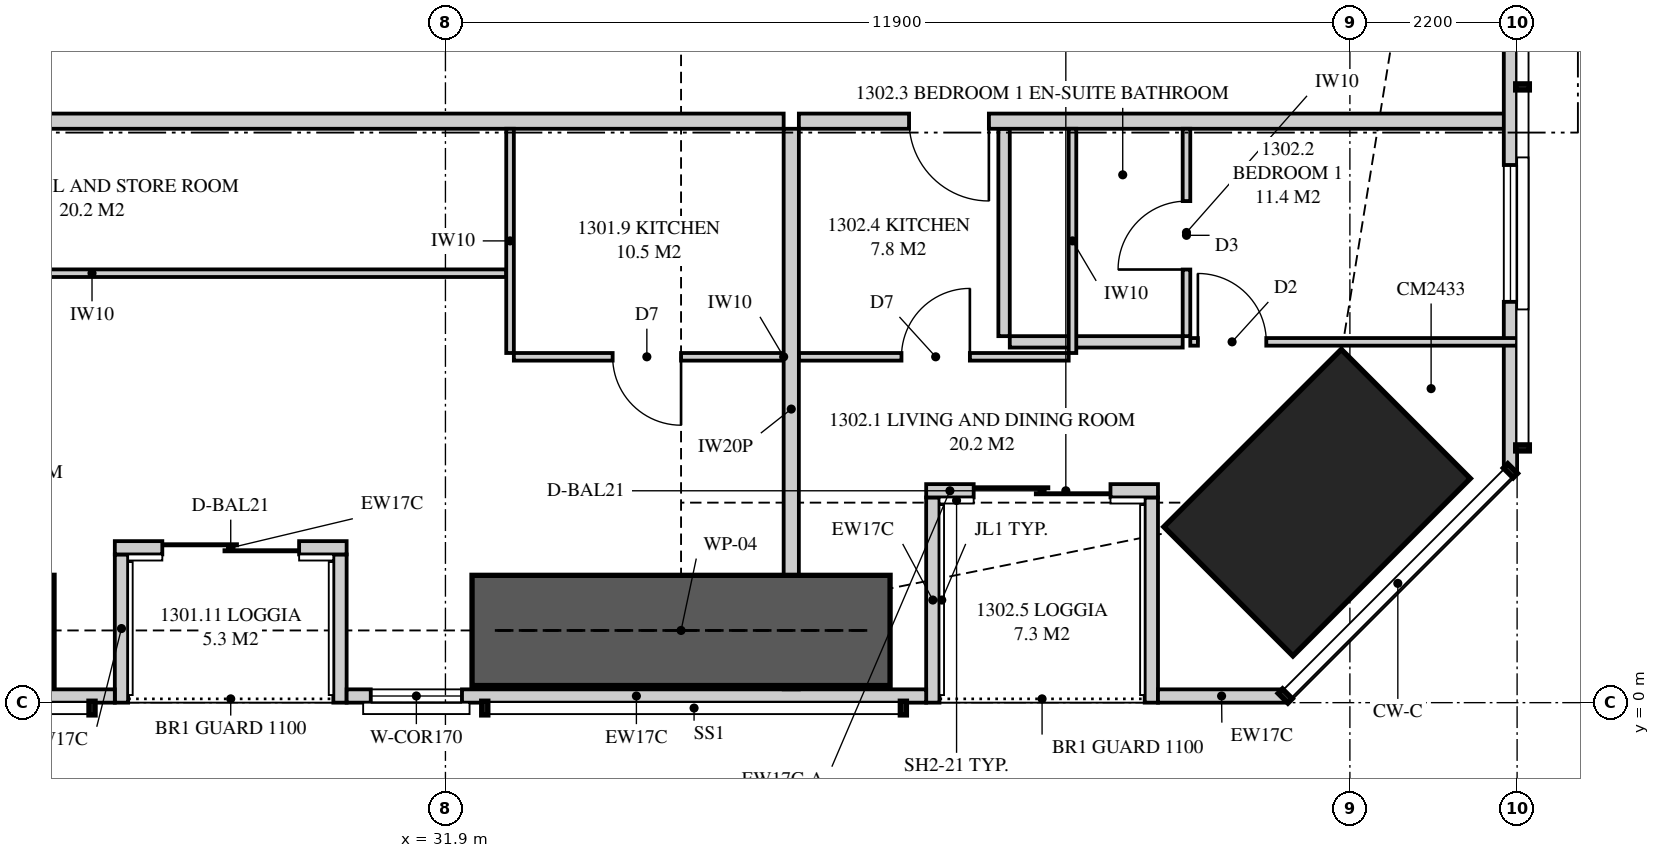
"""IFC4 building model, lengths in metres.
Left out: names, types, materials, properties, quantities, classifications, styles, units other than length and angle.
Written with IfcOpenShell. Run it as: python <this file> out.ifc"""

import sys

from ifc_helpers import new_model, si_unit, direction, frame, frame_2d, origin, origin_2d, place, context, subcontext, project, spatial, polyline, rectangle, outline, extrude, element, fill, save


model = new_model("IFC4")
c1 = context("Model", 3, precision=1e-05, world=origin(), true_north=direction((0.0, 1.0)))
c2 = subcontext(c1, "Body", "Model", "MODEL_VIEW")
j1 = project(units=[si_unit("LENGTHUNIT", "METRE"), si_unit("PLANEANGLEUNIT", "RADIAN")], contexts=[c1])
p1 = place(None, origin())
s1 = spatial("IfcSite", under=j1, at=p1, CompositionType="ELEMENT")
p2 = place(p1, origin())
s2 = spatial("IfcBuilding", under=s1, at=p2, CompositionType="ELEMENT")
p3 = place(p2, frame((0.0, 0.0, 51.15)))
s3 = spatial("IfcBuildingStorey", under=s2, at=p3, CompositionType="ELEMENT", Elevation=51.15)
p4 = place(p3, frame((43.369, 2.631, 0.0), z_axis=(0.0, 0.0, 1.0), x_axis=(-0.707106781187, 0.707106781187, 0.0)))
e1 = element("IfcColumn", 1, at=p4, inside=s3, PredefinedType="COLUMN", context=c2, shape_type="SweptSolid", body=[
    extrude(rectangle(XDim=2.4, YDim=3.3, at=origin_2d()), origin(), (0.0, 0.0, 1.0), 3.35),
])
p5 = place(p3, frame((5.051, 0.087, 0.0), z_axis=(0.0, 0.0, 1.0), x_axis=(1.0, 0.0, 0.0)))
e2 = element("IfcWall", 2, at=p5, inside=s3, PredefinedType="SOLIDWALL", context=c2, shape_type="SweptSolid", body=[
    extrude(outline(polyline([(0.0, 0.0), (22.499, 0.0), (22.499, 2.15), (7.949, 2.15), (7.949, 3.11), (7.793, 3.11), (7.793, 2.15), (7.745, 2.15), (7.745, 3.11), (0.0, 3.11), (0.0, 0.0)])), frame((0.0, 0.087, 0.0), z_axis=(0.0, -1.0, 0.0), x_axis=(1.0, 0.0, 0.0)), (0.0, 0.0, 1.0), 0.175),
])
p6 = place(p5, frame((3.234, 0.0, 0.4)))
e3 = element("IfcOpeningElement", 3, at=p6, cuts=e2, PredefinedType="OPENING", context=c2, shape_type="SweptSolid", body=[
    extrude(rectangle(XDim=1.8, YDim=1.7, at=frame_2d((0.9, 0.85))), frame((0.0, 0.097, 0.0), z_axis=(0.0, -1.0, 0.0), x_axis=(1.0, 0.0, 0.0)), (0.0, 0.0, 1.0), 0.195),
])
p7 = place(p5, frame((10.806, 0.0, 0.4)))
e4 = element("IfcOpeningElement", 4, at=p7, cuts=e2, PredefinedType="OPENING", context=c2, shape_type="SweptSolid", body=[
    extrude(rectangle(XDim=1.8, YDim=1.7, at=frame_2d((0.9, 0.85))), frame((0.0, 0.097, 0.0), z_axis=(0.0, -1.0, 0.0), x_axis=(1.0, 0.0, 0.0)), (0.0, 0.0, 1.0), 0.195),
])
p8 = place(p5, frame((13.974, 0.0, 0.4)))
e5 = element("IfcOpeningElement", 5, at=p8, cuts=e2, PredefinedType="OPENING", context=c2, shape_type="SweptSolid", body=[
    extrude(rectangle(XDim=1.8, YDim=1.7, at=frame_2d((0.9, 0.85))), frame((0.0, 0.097, 0.0), z_axis=(0.0, -1.0, 0.0), x_axis=(1.0, 0.0, 0.0)), (0.0, 0.0, 1.0), 0.195),
])
p9 = place(p3, frame((30.6, 0.087, 0.0), z_axis=(0.0, 0.0, 1.0), x_axis=(1.0, 0.0, 0.0)))
e6 = element("IfcWall", 6, at=p9, inside=s3, PredefinedType="SOLIDWALL", context=c2, shape_type="SweptSolid", body=[
    extrude(outline(polyline([(0.0, 0.0), (7.625, 0.0), (7.625, 3.11), (4.604, 3.11), (4.604, 2.15), (4.556, 2.15), (4.556, 3.11), (4.4, 3.11), (4.4, 2.15), (0.0, 2.15), (0.0, 0.0)])), frame((0.0, 0.087, 0.0), z_axis=(0.0, -1.0, 0.0), x_axis=(1.0, 0.0, 0.0)), (0.0, 0.0, 1.0), 0.175),
])
p10 = place(p9, frame((0.317, 0.0, 0.4)))
e7 = element("IfcOpeningElement", 7, at=p10, cuts=e6, PredefinedType="OPENING", context=c2, shape_type="SweptSolid", body=[
    extrude(rectangle(XDim=1.2, YDim=1.7, at=frame_2d((0.6, 0.85))), frame((0.0, 0.097, 0.0), z_axis=(0.0, -1.0, 0.0), x_axis=(1.0, 0.0, 0.0)), (0.0, 0.0, 1.0), 0.195),
])
p11 = place(p3, frame((41.275, 0.087, 0.0), z_axis=(0.0, 0.0, 1.0), x_axis=(1.0, 0.0, 0.0)))
e8 = element("IfcWall", 8, at=p11, inside=s3, PredefinedType="SOLIDWALL", context=c2, shape_type="SweptSolid", body=[
    extrude(rectangle(XDim=1.674, YDim=0.175, at=frame_2d((0.837, 0.0))), origin(), (0.0, 0.0, 1.0), 3.11),
])
p12 = place(p3, frame((27.55, 2.038, 0.0), z_axis=(0.0, 0.0, 1.0), x_axis=(1.0, 0.0, 0.0)))
e9 = element("IfcWall", 9, at=p12, inside=s3, PredefinedType="SOLIDWALL", context=c2, shape_type="SweptSolid", body=[
    extrude(rectangle(XDim=3.05, YDim=0.175, at=frame_2d((1.525, 0.0))), origin(), (0.0, 0.0, 1.0), 3.11),
])
p13 = place(p12, frame((0.625, 0.0, 0.0)))
e10 = element("IfcOpeningElement", 10, at=p13, cuts=e9, PredefinedType="OPENING", context=c2, shape_type="SweptSolid", body=[
    extrude(rectangle(XDim=1.8, YDim=2.1, at=frame_2d((0.9, 1.05))), frame((0.0, 0.097, 0.0), z_axis=(0.0, -1.0, 0.0), x_axis=(1.0, 0.0, 0.0)), (0.0, 0.0, 1.0), 0.195),
])
for number, where, z_axis, x_axis in (
    (11, (27.637, 0.0, 0.0), (0.0, 0.0, 1.0), (0.0, 1.0, 0.0)),
    (12, (30.512, 0.0, 0.0), (0.0, 0.0, 1.0), (0.0, 1.0, 0.0)),
):
    element("IfcWall", number, at=place(p3, frame(where, z_axis=z_axis, x_axis=x_axis)), inside=s3, PredefinedType="SOLIDWALL", context=c2, shape_type="SweptSolid", body=[
        extrude(outline(polyline([(0.0, 0.0), (1.95, 0.0), (1.95, 3.11), (1.75, 3.11), (1.75, 2.15), (0.15, 2.15), (0.15, 3.11), (0.0, 3.11), (0.0, 0.0)])), frame((0.0, 0.087, 0.0), z_axis=(0.0, -1.0, 0.0), x_axis=(1.0, 0.0, 0.0)), (0.0, 0.0, 1.0), 0.175),
    ])
p14 = place(p3, frame((38.225, 2.788, 0.0), z_axis=(0.0, 0.0, 1.0), x_axis=(1.0, 0.0, 0.0)))
e13 = element("IfcWall", 13, at=p14, inside=s3, PredefinedType="SOLIDWALL", context=c2, shape_type="SweptSolid", body=[
    extrude(rectangle(XDim=0.625, YDim=0.175, at=frame_2d((0.312, 0.0))), origin(), (0.0, 0.0, 1.0), 2.51),
])
p15 = place(p3, frame((38.85, 2.788, 0.0), z_axis=(0.0, 0.0, 1.0), x_axis=(1.0, 0.0, 0.0)))
e14 = element("IfcWall", 14, at=p15, inside=s3, PredefinedType="SOLIDWALL", context=c2, shape_type="SweptSolid", body=[
    extrude(rectangle(XDim=2.425, YDim=0.175, at=frame_2d((1.212, 0.0))), origin(), (0.0, 0.0, 1.0), 2.15),
])
p16 = place(p15, origin())
e15 = element("IfcOpeningElement", 15, at=p16, cuts=e14, PredefinedType="OPENING", context=c2, shape_type="SweptSolid", body=[
    extrude(rectangle(XDim=1.8, YDim=2.1, at=frame_2d((0.9, 1.05))), frame((0.0, 0.097, 0.0), z_axis=(0.0, -1.0, 0.0), x_axis=(1.0, 0.0, 0.0)), (0.0, 0.0, 1.0), 0.195),
])
p17 = place(p3, frame((38.312, 0.0, 0.0), z_axis=(0.0, 0.0, 1.0), x_axis=(0.0, 1.0, 0.0)))
e16 = element("IfcWall", 16, at=p17, inside=s3, PredefinedType="SOLIDWALL", context=c2, shape_type="SweptSolid", body=[
    extrude(outline(polyline([(0.0, 0.0), (2.7, 0.0), (2.7, 2.51), (2.449, 2.51), (2.449, 2.15), (0.782, 2.15), (0.782, 3.11), (0.0, 3.11), (0.0, 0.0)])), frame((0.0, 0.087, 0.0), z_axis=(0.0, -1.0, 0.0), x_axis=(1.0, 0.0, 0.0)), (0.0, 0.0, 1.0), 0.175),
])
p18 = place(p3, frame((41.188, 0.0, 0.0), z_axis=(0.0, 0.0, 1.0), x_axis=(0.0, 1.0, 0.0)))
e17 = element("IfcWall", 17, at=p18, inside=s3, PredefinedType="SOLIDWALL", context=c2, shape_type="SweptSolid", body=[
    extrude(outline(polyline([(0.0, 0.0), (2.7, 0.0), (2.7, 2.15), (1.36, 2.15), (1.36, 3.11), (0.0, 3.11), (0.0, 0.0)])), frame((0.0, 0.087, 0.0), z_axis=(0.0, -1.0, 0.0), x_axis=(1.0, 0.0, 0.0)), (0.0, 0.0, 1.0), 0.175),
])
p19 = place(p3, frame((45.913, 3.051, 0.0), z_axis=(0.0, 0.0, 1.0), x_axis=(0.0, 1.0, 0.0)))
e18 = element("IfcWall", 18, at=p19, inside=s3, PredefinedType="SOLIDWALL", context=c2, shape_type="SweptSolid", body=[
    extrude(outline(polyline([(0.0, 0.0), (31.897, 0.0), (31.897, 3.11), (22.167, 3.11), (22.167, 2.15), (22.074, 2.15), (22.074, 3.11), (21.949, 3.11), (21.949, 2.15), (9.949, 2.15), (9.949, 3.11), (9.823, 3.11), (9.823, 2.15), (9.73, 2.15), (9.73, 3.11), (0.0, 3.11), (0.0, 0.0)])), frame((0.0, 0.087, 0.0), z_axis=(0.0, -1.0, 0.0), x_axis=(1.0, 0.0, 0.0)), (0.0, 0.0, 1.0), 0.175),
])
p20 = place(p19, frame((2.222, 0.0, 0.4)))
e19 = element("IfcOpeningElement", 19, at=p20, cuts=e18, PredefinedType="OPENING", context=c2, shape_type="SweptSolid", body=[
    extrude(rectangle(XDim=1.8, YDim=1.7, at=frame_2d((0.9, 0.85))), frame((0.0, 0.097, 0.0), z_axis=(0.0, -1.0, 0.0), x_axis=(1.0, 0.0, 0.0)), (0.0, 0.0, 1.0), 0.195),
])
p21 = place(p19, frame((14.849, 0.0, 0.4)))
e20 = element("IfcOpeningElement", 20, at=p21, cuts=e18, PredefinedType="OPENING", context=c2, shape_type="SweptSolid", body=[
    extrude(rectangle(XDim=1.2, YDim=1.7, at=frame_2d((0.6, 0.85))), frame((0.0, 0.097, 0.0), z_axis=(0.0, -1.0, 0.0), x_axis=(1.0, 0.0, 0.0)), (0.0, 0.0, 1.0), 0.195),
])
p22 = place(p19, frame((27.375, 0.0, 0.4)))
e21 = element("IfcOpeningElement", 21, at=p22, cuts=e18, PredefinedType="OPENING", context=c2, shape_type="SweptSolid", body=[
    extrude(rectangle(XDim=1.8, YDim=1.7, at=frame_2d((0.9, 0.85))), frame((0.0, 0.097, 0.0), z_axis=(0.0, -1.0, 0.0), x_axis=(1.0, 0.0, 0.0)), (0.0, 0.0, 1.0), 0.195),
])
p23 = place(p3, frame((36.45, 0.175, 0.0), z_axis=(0.0, 0.0, 1.0), x_axis=(0.0, 1.0, 0.0)))
e22 = element("IfcWall", 22, at=p23, inside=s3, PredefinedType="PARTITIONING", context=c2, shape_type="SweptSolid", body=[
    extrude(outline(polyline([(0.138, 3.11), (0.0, 3.11), (0.0, 0.0), (0.529, 0.0), (0.529, 0.513), (1.021, 0.513), (1.021, 0.0), (7.375, 0.0), (7.375, 3.11), (3.766, 3.11), (3.766, 2.51), (1.994, 2.51), (1.994, 2.15), (1.021, 2.15), (1.021, 1.637), (0.529, 1.637), (0.529, 2.15), (0.138, 2.15), (0.138, 3.11)])), frame((0.0, 0.1, 0.0), z_axis=(0.0, -1.0, 0.0), x_axis=(1.0, 0.0, 0.0)), (0.0, 0.0, 1.0), 0.2),
])
p24 = place(p3, frame((17.725, 7.65, 0.0), z_axis=(0.0, 0.0, 1.0), x_axis=(1.0, 0.0, 0.0)))
e23 = element("IfcWall", 23, at=p24, inside=s3, PredefinedType="PARTITIONING", context=c2, shape_type="SweptSolid", body=[
    extrude(outline(polyline([(0.0, 0.0), (18.625, 0.0), (18.625, 3.11), (17.612, 3.11), (17.612, 2.541), (16.938, 2.541), (16.938, 3.11), (6.612, 3.11), (6.612, 2.541), (5.938, 2.541), (5.938, 3.11), (0.0, 3.11), (0.0, 0.0)])), frame((0.0, 0.1, 0.0), z_axis=(0.0, -1.0, 0.0), x_axis=(1.0, 0.0, 0.0)), (0.0, 0.0, 1.0), 0.2),
])
p25 = place(p24, frame((1.0, 0.0, 0.0)))
e24 = element("IfcOpeningElement", 24, at=p25, cuts=e23, PredefinedType="OPENING", context=c2, shape_type="SweptSolid", body=[
    extrude(rectangle(XDim=1.05, YDim=2.2, at=frame_2d((0.525, 1.1))), frame((0.0, 0.11, 0.0), z_axis=(0.0, -1.0, 0.0), x_axis=(1.0, 0.0, 0.0)), (0.0, 0.0, 1.0), 0.22),
])
p26 = place(p3, frame((32.8, 4.55, 0.0), z_axis=(0.0, 0.0, 1.0), x_axis=(1.0, 0.0, 0.0)))
e25 = element("IfcWall", 25, at=p26, inside=s3, PredefinedType="PARTITIONING", context=c2, shape_type="SweptSolid", body=[
    extrude(outline(polyline([(0.0, 0.0), (3.55, 0.0), (3.55, 3.11), (2.487, 3.11), (2.487, 2.541), (1.913, 2.541), (1.913, 3.11), (0.0, 3.11), (0.0, 0.0)])), frame((0.0, 0.05, 0.0), z_axis=(0.0, -1.0, 0.0), x_axis=(1.0, 0.0, 0.0)), (0.0, 0.0, 1.0), 0.1),
])
p27 = place(p26, frame((1.3, 0.0, 0.0)))
e26 = element("IfcOpeningElement", 26, at=p27, cuts=e25, PredefinedType="OPENING", context=c2, shape_type="SweptSolid", body=[
    extrude(rectangle(XDim=0.9, YDim=2.1, at=frame_2d((0.45, 1.05))), frame((0.0, 0.06, 0.0), z_axis=(0.0, -1.0, 0.0), x_axis=(1.0, 0.0, 0.0)), (0.0, 0.0, 1.0), 0.12),
])
p28 = place(p3, frame((32.75, 4.6, 0.0), z_axis=(0.0, 0.0, 1.0), x_axis=(0.0, 1.0, 0.0)))
e27 = element("IfcWall", 27, at=p28, inside=s3, PredefinedType="PARTITIONING", context=c2, shape_type="SweptSolid", body=[
    extrude(rectangle(XDim=2.95, YDim=0.1, at=frame_2d((1.475, 0.0))), origin(), (0.0, 0.0, 1.0), 3.11),
])
p29 = place(p3, frame((21.8, 5.65, 0.0), z_axis=(0.0, 0.0, 1.0), x_axis=(1.0, 0.0, 0.0)))
e28 = element("IfcWall", 28, at=p29, inside=s3, PredefinedType="PARTITIONING", context=c2, shape_type="SweptSolid", body=[
    extrude(outline(polyline([(0.0, 0.0), (10.9, 0.0), (10.9, 3.11), (2.487, 3.11), (2.487, 2.541), (1.913, 2.541), (1.913, 3.11), (0.0, 3.11), (0.0, 0.0)])), frame((0.0, 0.05, 0.0), z_axis=(0.0, -1.0, 0.0), x_axis=(1.0, 0.0, 0.0)), (0.0, 0.0, 1.0), 0.1),
])
p30 = place(p29, frame((0.3, 0.0, 0.0)))
e29 = element("IfcOpeningElement", 29, at=p30, cuts=e28, PredefinedType="OPENING", context=c2, shape_type="SweptSolid", body=[
    extrude(rectangle(XDim=1.0, YDim=2.1, at=frame_2d((0.5, 1.05))), frame((0.0, 0.06, 0.0), z_axis=(0.0, -1.0, 0.0), x_axis=(1.0, 0.0, 0.0)), (0.0, 0.0, 1.0), 0.12),
])
p31 = place(p3, frame((36.55, 7.65, 0.0), z_axis=(0.0, 0.0, 1.0), x_axis=(1.0, 0.0, 0.0)))
e30 = element("IfcWall", 30, at=p31, inside=s3, PredefinedType="PARTITIONING", context=c2, shape_type="SweptSolid", body=[
    extrude(outline(polyline([(0.0, 0.0), (9.45, 0.0), (9.45, 3.11), (8.554, 3.11), (8.554, 2.15), (6.71, 2.15), (6.71, 3.11), (0.0, 3.11), (0.0, 0.0)])), frame((0.0, 0.1, 0.0), z_axis=(0.0, -1.0, 0.0), x_axis=(1.0, 0.0, 0.0)), (0.0, 0.0, 1.0), 0.2),
])
p32 = place(p31, frame((1.45, 0.0, 0.0)))
e31 = element("IfcOpeningElement", 31, at=p32, cuts=e30, PredefinedType="OPENING", context=c2, shape_type="SweptSolid", body=[
    extrude(rectangle(XDim=1.05, YDim=2.2, at=frame_2d((0.525, 1.1))), frame((0.0, 0.11, 0.0), z_axis=(0.0, -1.0, 0.0), x_axis=(1.0, 0.0, 0.0)), (0.0, 0.0, 1.0), 0.22),
])
p33 = place(p3, frame((41.65, 4.822, 0.0), z_axis=(0.0, 0.0, 1.0), x_axis=(0.0, 1.0, 0.0)))
e32 = element("IfcWall", 32, at=p33, inside=s3, PredefinedType="PARTITIONING", context=c2, shape_type="SweptSolid", body=[
    extrude(rectangle(XDim=2.728, YDim=0.1, at=frame_2d((1.364, 0.0))), origin(), (0.0, 0.0, 1.0), 3.11),
])
p34 = place(p33, frame((0.877, 0.0, 0.0)))
e33 = element("IfcOpeningElement", 33, at=p34, cuts=e32, PredefinedType="OPENING", context=c2, shape_type="SweptSolid", body=[
    extrude(rectangle(XDim=0.9, YDim=2.1, at=frame_2d((0.45, 1.05))), frame((0.0, 0.06, 0.0), z_axis=(0.0, -1.0, 0.0), x_axis=(1.0, 0.0, 0.0)), (0.0, 0.0, 1.0), 0.12),
])
p35 = place(p3, frame((41.7, 4.747, 0.0), z_axis=(0.0, 0.0, 1.0), x_axis=(1.0, 0.0, 0.0)))
e34 = element("IfcWall", 34, at=p35, inside=s3, PredefinedType="PARTITIONING", context=c2, shape_type="SweptSolid", body=[
    extrude(outline(polyline([(0.0, 0.0), (4.3, 0.0), (4.3, 3.11), (2.883, 3.11), (2.883, 2.15), (1.14, 2.15), (1.14, 3.11), (0.0, 3.11), (0.0, 0.0)])), frame((0.0, 0.05, 0.0), z_axis=(0.0, -1.0, 0.0), x_axis=(1.0, 0.0, 0.0)), (0.0, 0.0, 1.0), 0.1),
])
p36 = place(p35, frame((0.1, 0.0, 0.0)))
e35 = element("IfcOpeningElement", 35, at=p36, cuts=e34, PredefinedType="OPENING", context=c2, shape_type="SweptSolid", body=[
    extrude(rectangle(XDim=0.9, YDim=2.1, at=frame_2d((0.45, 1.05))), frame((0.0, 0.06, 0.0), z_axis=(0.0, -1.0, 0.0), x_axis=(1.0, 0.0, 0.0)), (0.0, 0.0, 1.0), 0.12),
])
p37 = place(p3, frame((39.325, 4.747, 0.0), z_axis=(0.0, 0.0, 1.0), x_axis=(1.0, 0.0, 0.0)))
e36 = element("IfcWall", 36, at=p37, inside=s3, PredefinedType="PLUMBINGWALL", context=c2, shape_type="SweptSolid", body=[
    extrude(rectangle(XDim=2.275, YDim=0.15, at=frame_2d((1.138, 0.0))), origin(), (0.0, 0.0, 1.0), 3.11),
])
p38 = place(p3, frame((39.25, 4.822, 0.0), z_axis=(0.0, 0.0, 1.0), x_axis=(0.0, 1.0, 0.0)))
e37 = element("IfcWall", 37, at=p38, inside=s3, PredefinedType="PLUMBINGWALL", context=c2, shape_type="SweptSolid", body=[
    extrude(rectangle(XDim=2.728, YDim=0.15, at=frame_2d((1.364, 0.0))), origin(), (0.0, 0.0, 1.0), 3.11),
])
p39 = place(p3, frame((36.55, 4.55, 0.0), z_axis=(0.0, 0.0, 1.0), x_axis=(1.0, 0.0, 0.0)))
e38 = element("IfcWall", 38, at=p39, inside=s3, PredefinedType="PARTITIONING", context=c2, shape_type="SweptSolid", body=[
    extrude(rectangle(XDim=3.55, YDim=0.1, at=frame_2d((1.775, 0.0))), origin(), (0.0, 0.0, 1.0), 3.11),
])
p40 = place(p39, frame((1.35, 0.0, 0.0)))
e39 = element("IfcOpeningElement", 39, at=p40, cuts=e38, PredefinedType="OPENING", context=c2, shape_type="SweptSolid", body=[
    extrude(rectangle(XDim=0.9, YDim=2.1, at=frame_2d((0.45, 1.05))), frame((0.0, 0.06, 0.0), z_axis=(0.0, -1.0, 0.0), x_axis=(1.0, 0.0, 0.0)), (0.0, 0.0, 1.0), 0.12),
])
p41 = place(p3, frame((40.15, 4.6, 0.0), z_axis=(0.0, 0.0, 1.0), x_axis=(0.0, 1.0, 0.0)))
e40 = element("IfcWall", 40, at=p41, inside=s3, PredefinedType="PARTITIONING", context=c2, shape_type="SweptSolid", body=[
    extrude(rectangle(XDim=2.95, YDim=0.1, at=frame_2d((1.475, 0.0))), origin(), (0.0, 0.0, 1.0), 3.11),
])
for number, where, z_axis, x_axis in (
    (41, (21.25, 0.95, 0.0), (0.0, 0.0, 1.0), (1.0, 0.0, 0.0)),
    (42, (32.25, 0.95, 0.0), (0.0, 0.0, 1.0), (1.0, 0.0, 0.0)),
):
    element("IfcWall", number, at=place(p3, frame(where, z_axis=z_axis, x_axis=x_axis)), inside=s3, PredefinedType="SHEAR", context=c2, shape_type="SweptSolid", body=[
        extrude(rectangle(XDim=5.5, YDim=1.45, at=frame_2d((2.75, 0.0))), origin(), (0.0, 0.0, 1.0), 3.35),
    ])
p42 = place(p13, origin())
e43 = element("IfcDoor", 43, at=p42, inside=s3, OperationType="SLIDING_TO_LEFT", PredefinedType="DOOR", context=c2, shape_type="SweptSolid", body=[
    extrude(rectangle(XDim=1.8, YDim=2.1, at=frame_2d((0.9, 1.05))), frame((0.0, 0.025, 0.0), z_axis=(0.0, -1.0, 0.0), x_axis=(1.0, 0.0, 0.0)), (0.0, 0.0, 1.0), 0.05),
])
fill(e10, e43)
p43 = place(p10, origin())
e44 = element("IfcWindow", 44, at=p43, inside=s3, PartitioningType="SINGLE_PANEL", PredefinedType="WINDOW", context=c2, shape_type="SweptSolid", body=[
    extrude(rectangle(XDim=1.2, YDim=1.7, at=frame_2d((0.6, 0.85))), frame((0.0, 0.03, 0.0), z_axis=(0.0, -1.0, 0.0), x_axis=(1.0, 0.0, 0.0)), (0.0, 0.0, 1.0), 0.06),
])
fill(e7, e44)
p44 = place(p16, origin())
e45 = element("IfcDoor", 45, at=p44, inside=s3, OperationType="SLIDING_TO_LEFT", PredefinedType="DOOR", context=c2, shape_type="SweptSolid", body=[
    extrude(rectangle(XDim=1.8, YDim=2.1, at=frame_2d((0.9, 1.05))), frame((0.0, 0.025, 0.0), z_axis=(0.0, -1.0, 0.0), x_axis=(1.0, 0.0, 0.0)), (0.0, 0.0, 1.0), 0.05),
])
fill(e15, e45)
p45 = place(p20, origin())
e46 = element("IfcWindow", 46, at=p45, inside=s3, PartitioningType="SINGLE_PANEL", PredefinedType="WINDOW", context=c2, shape_type="SweptSolid", body=[
    extrude(rectangle(XDim=1.8, YDim=1.7, at=frame_2d((0.9, 0.85))), frame((0.0, 0.03, 0.0), z_axis=(0.0, -1.0, 0.0), x_axis=(1.0, 0.0, 0.0)), (0.0, 0.0, 1.0), 0.06),
])
fill(e19, e46)
p46 = place(p27, frame((0.9, 0.0, 0.0), z_axis=(0.0, 0.0, 1.0), x_axis=(-1.0, 0.0, 0.0)))
e47 = element("IfcDoor", 47, at=p46, inside=s3, OperationType="SINGLE_SWING_LEFT", PredefinedType="DOOR", context=c2, shape_type="SweptSolid", body=[
    extrude(rectangle(XDim=0.9, YDim=2.1, at=frame_2d((0.45, 1.05))), frame((0.0, 0.025, 0.0), z_axis=(0.0, -1.0, 0.0), x_axis=(1.0, 0.0, 0.0)), (0.0, 0.0, 1.0), 0.05),
])
fill(e26, e47)
p47 = place(p32, frame((1.05, 0.0, 0.0), z_axis=(0.0, 0.0, 1.0), x_axis=(-1.0, 0.0, 0.0)))
e48 = element("IfcDoor", 48, at=p47, inside=s3, OperationType="SINGLE_SWING_LEFT", PredefinedType="DOOR", context=c2, shape_type="SweptSolid", body=[
    extrude(rectangle(XDim=1.05, YDim=2.2, at=frame_2d((0.525, 1.1))), frame((0.0, 0.025, 0.0), z_axis=(0.0, -1.0, 0.0), x_axis=(1.0, 0.0, 0.0)), (0.0, 0.0, 1.0), 0.05),
])
fill(e31, e48)
p48 = place(p36, origin())
e49 = element("IfcDoor", 49, at=p48, inside=s3, OperationType="SINGLE_SWING_LEFT", PredefinedType="DOOR", context=c2, shape_type="SweptSolid", body=[
    extrude(rectangle(XDim=0.9, YDim=2.1, at=frame_2d((0.45, 1.05))), frame((0.0, 0.025, 0.0), z_axis=(0.0, -1.0, 0.0), x_axis=(1.0, 0.0, 0.0)), (0.0, 0.0, 1.0), 0.05),
])
fill(e35, e49)
p49 = place(p34, origin())
e50 = element("IfcDoor", 50, at=p49, inside=s3, OperationType="SINGLE_SWING_LEFT", PredefinedType="DOOR", context=c2, shape_type="SweptSolid", body=[
    extrude(rectangle(XDim=0.9, YDim=2.1, at=frame_2d((0.45, 1.05))), frame((0.0, 0.025, 0.0), z_axis=(0.0, -1.0, 0.0), x_axis=(1.0, 0.0, 0.0)), (0.0, 0.0, 1.0), 0.05),
])
fill(e33, e50)
p50 = place(p40, origin())
e51 = element("IfcDoor", 51, at=p50, inside=s3, OperationType="SINGLE_SWING_RIGHT", PredefinedType="DOOR", context=c2, shape_type="SweptSolid", body=[
    extrude(rectangle(XDim=0.9, YDim=2.1, at=frame_2d((0.45, 1.05))), frame((0.0, 0.025, 0.0), z_axis=(0.0, -1.0, 0.0), x_axis=(1.0, 0.0, 0.0)), (0.0, 0.0, 1.0), 0.05),
])
fill(e39, e51)
save(model, sys.argv[1])
